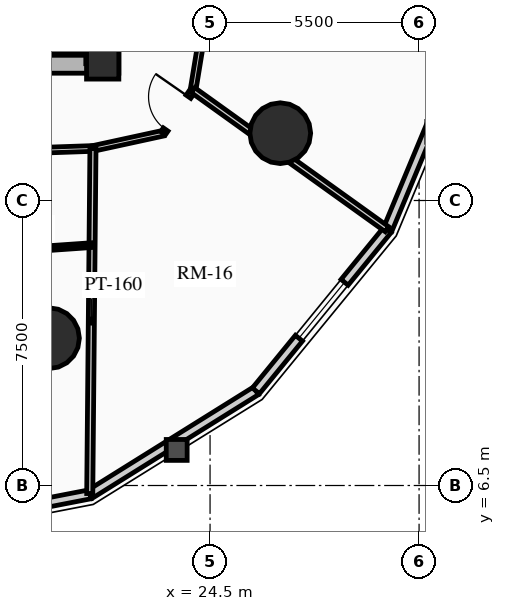
"""IFC4 building model, lengths in metres.
Left out: names, types, materials, properties, quantities, classifications, styles, units other than length and angle.
Written with IfcOpenShell. Run it as: python <this file> out.ifc"""

import sys

from ifc_helpers import new_model, si_unit, direction, frame, frame_2d, origin, origin_2d, place, context, subcontext, project, spatial, rectangle, circle, extrude, source, transform, mapped, element, fill, save


model = new_model("IFC4")
c1 = context("Model", 3, precision=1e-05, world=origin(), true_north=direction((0.0, 1.0)))
c2 = subcontext(c1, "Body", "Model", "MODEL_VIEW")
j1 = project(units=[si_unit("LENGTHUNIT", "METRE"), si_unit("PLANEANGLEUNIT", "RADIAN")], contexts=[c1])
p1 = place(None, origin())
s1 = spatial("IfcSite", under=j1, at=p1, CompositionType="ELEMENT")
p2 = place(p1, origin())
s2 = spatial("IfcBuilding", under=s1, at=p2, CompositionType="ELEMENT")
p3 = place(p2, frame((0.0, 0.0, 59.83)))
s3 = spatial("IfcBuildingStorey", under=s2, at=p3, CompositionType="ELEMENT", Elevation=59.83)
p4 = place(p3, frame((21.85, 17.35, 0.0), z_axis=(0.0, 0.0, 1.0), x_axis=(0.0, 1.0, 0.0)))
e1 = element("IfcWall", 1, at=p4, inside=s3, PredefinedType="SHEAR", context=c2, shape_type="SweptSolid", body=[
    extrude(rectangle(XDim=14.3, YDim=0.5, at=frame_2d((7.15, 0.0))), origin(), (0.0, 0.0, 1.0), 2.91),
])
p5 = place(p3, frame((11.15, 17.6, 0.0), z_axis=(0.0, 0.0, 1.0), x_axis=(1.0, 0.0, 0.0)))
e2 = element("IfcWall", 2, at=p5, inside=s3, PredefinedType="SHEAR", context=c2, shape_type="SweptSolid", body=[
    extrude(rectangle(XDim=10.7, YDim=0.5, at=frame_2d((5.35, 0.0))), origin(), (0.0, 0.0, 1.0), 2.91),
])
m1 = source(origin(), c2, "Body", "SweptSolid", [
    extrude(rectangle(XDim=1.5, YDim=2.02, at=frame_2d((0.75, 1.01))), frame((0.0, 0.26, 0.0), z_axis=(0.0, -1.0, 0.0), x_axis=(1.0, 0.0, 0.0)), (0.0, 0.0, 1.0), 0.52),
])
p6 = place(p5, frame((5.45, 0.0, 0.0)))
e3 = element("IfcOpeningElement", 3, at=p6, cuts=e2, PredefinedType="OPENING", context=c2, shape_type="MappedRepresentation", body=[
    mapped(m1, transform((0.0, 0.0, 0.0), x_axis=(1.0, 0.0, 0.0), y_axis=(0.0, 1.0, 0.0), z_axis=(0.0, 0.0, 1.0), scale=1.0)),
])
p7 = place(p3, frame((21.405, 17.6, 0.0), z_axis=(0.0, 0.0, 1.0), x_axis=(0.0, 1.0, 0.0)))
e4 = element("IfcWall", 4, at=p7, inside=s3, PredefinedType="SHEAR", context=c2, shape_type="SweptSolid", body=[
    extrude(rectangle(XDim=6.745, YDim=0.35, at=frame_2d((3.373, 0.0))), origin(), (0.0, 0.0, 1.0), 2.91),
])
p8 = place(p3, frame((21.675, 17.62, 0.0), z_axis=(0.0, 0.0, 1.0), x_axis=(1.0, 0.0, 0.0)))
e5 = element("IfcColumn", 5, at=p8, inside=s3, PredefinedType="COLUMN", context=c2, shape_type="SweptSolid", body=[
    extrude(rectangle(XDim=0.85, YDim=0.85, at=origin_2d()), origin(), (0.0, 0.0, 1.0), 2.91),
])
for number, where, z_axis, x_axis in (
    (6, (20.261, 10.377, 0.0), (0.0, 0.0, 1.0), (1.0, 0.0, 0.0)),
    (7, (26.347, 15.771, 0.0), (0.0, 0.0, 1.0), (1.0, 0.0, 0.0)),
):
    element("IfcColumn", number, at=place(p3, frame(where, z_axis=z_axis, x_axis=x_axis)), inside=s3, PredefinedType="USERDEFINED", context=c2, shape_type="SweptSolid", body=[
        extrude(circle(Radius=0.8, at=origin_2d()), origin(), (0.0, 0.0, 1.0), 2.91),
    ])
p9 = place(p3, frame((21.34, 6.268, 0.0), z_axis=(0.0, 0.0, 1.0), x_axis=(-0.981725274071, -0.190303668512, 0.0)))
e8 = element("IfcWall", 8, at=p9, inside=s3, PredefinedType="SOLIDWALL", context=c2, shape_type="SweptSolid", body=[
    extrude(rectangle(XDim=4.93, YDim=0.24, at=frame_2d((2.465, 0.0))), origin(), (0.0, 0.0, 1.0), 2.073),
])
m2 = source(origin(), c2, "Body", "SweptSolid", [
    extrude(rectangle(XDim=2.2, YDim=1.35, at=frame_2d((1.1, 0.675))), frame((0.0, 0.13, 0.0), z_axis=(0.0, -1.0, 0.0), x_axis=(1.0, 0.0, 0.0)), (0.0, 0.0, 1.0), 0.26),
])
p10 = place(p9, frame((1.365, 0.0, 0.65)))
e9 = element("IfcOpeningElement", 9, at=p10, cuts=e8, PredefinedType="OPENING", context=c2, shape_type="MappedRepresentation", body=[
    mapped(m2, transform((0.0, 0.0, 0.0), x_axis=(1.0, 0.0, 0.0), y_axis=(0.0, 1.0, 0.0), z_axis=(0.0, 0.0, 1.0), scale=1.0)),
])
p11 = place(p3, frame((25.707, 8.991, 0.0), z_axis=(0.0, 0.0, 1.0), x_axis=(-0.848533613342, -0.529141481107, 0.0)))
e10 = element("IfcWall", 10, at=p11, inside=s3, PredefinedType="SOLIDWALL", context=c2, shape_type="SweptSolid", body=[
    extrude(rectangle(XDim=5.146, YDim=0.24, at=frame_2d((2.573, 0.0))), origin(), (0.0, 0.0, 1.0), 2.073),
])
p12 = place(p3, frame((29.172, 13.232, 0.0), z_axis=(0.0, 0.0, 1.0), x_axis=(-0.632713287022, -0.77438614168, 0.0)))
e11 = element("IfcWall", 11, at=p12, inside=s3, PredefinedType="SOLIDWALL", context=c2, shape_type="SweptSolid", body=[
    extrude(rectangle(XDim=5.477, YDim=0.24, at=frame_2d((2.738, 0.0))), origin(), (0.0, 0.0, 1.0), 2.073),
])
m3 = source(origin(), c2, "Body", "SweptSolid", [
    extrude(rectangle(XDim=1.9, YDim=1.35, at=frame_2d((0.95, 0.675))), frame((0.0, 0.13, 0.0), z_axis=(0.0, -1.0, 0.0), x_axis=(1.0, 0.0, 0.0)), (0.0, 0.0, 1.0), 0.26),
])
p13 = place(p12, frame((1.788, 0.0, 0.65)))
e12 = element("IfcOpeningElement", 12, at=p13, cuts=e11, PredefinedType="OPENING", context=c2, shape_type="MappedRepresentation", body=[
    mapped(m3, transform((0.0, 0.0, 0.0), x_axis=(1.0, 0.0, 0.0), y_axis=(0.0, 1.0, 0.0), z_axis=(0.0, 0.0, 1.0), scale=1.0)),
])
p14 = place(p3, frame((31.396, 18.576, 0.0), z_axis=(0.0, 0.0, 1.0), x_axis=(-0.384348836956, -0.923187939442, 0.0)))
e13 = element("IfcWall", 13, at=p14, inside=s3, PredefinedType="SOLIDWALL", context=c2, shape_type="SweptSolid", body=[
    extrude(rectangle(XDim=5.789, YDim=0.24, at=frame_2d((2.894, 0.0))), origin(), (0.0, 0.0, 1.0), 2.073),
])
p15 = place(p3, frame((14.781, 15.141, 0.0), z_axis=(0.0, 0.0, 1.0), x_axis=(0.999407918707, 0.034406569513, 0.0)))
e14 = element("IfcWall", 14, at=p15, inside=s3, PredefinedType="PARTITIONING", context=c2, shape_type="SweptSolid", body=[
    extrude(rectangle(XDim=6.642, YDim=0.15, at=frame_2d((3.321, 0.0))), origin(), (0.0, 0.0, 1.0), 2.159),
])
p16 = place(p3, frame((21.419, 15.369, 0.0), z_axis=(0.0, 0.0, 1.0), x_axis=(0.977192701953, 0.212354475464, 0.0)))
e15 = element("IfcWall", 15, at=p16, inside=s3, PredefinedType="PARTITIONING", context=c2, shape_type="SweptSolid", body=[
    extrude(rectangle(XDim=1.888, YDim=0.15, at=frame_2d((0.944, 0.0))), origin(), (0.0, 0.0, 1.0), 2.205),
])
p17 = place(p3, frame((23.263, 15.77, 0.0), z_axis=(0.0, 0.0, 1.0), x_axis=(0.570743456919, 0.821128434768, 0.0)))
e16 = element("IfcWall", 16, at=p17, inside=s3, PredefinedType="PARTITIONING", context=c2, shape_type="SweptSolid", body=[
    extrude(rectangle(XDim=1.382, YDim=0.15, at=frame_2d((0.691, 0.0))), origin(), (0.0, 0.0, 1.0), 2.159),
])
m4 = source(origin(), c2, "Body", "SweptSolid", [
    extrude(rectangle(XDim=1.05, YDim=2.015, at=frame_2d((0.525, 1.007))), frame((0.0, 0.085, 0.0), z_axis=(0.0, -1.0, 0.0), x_axis=(1.0, 0.0, 0.0)), (0.0, 0.0, 1.0), 0.17),
])
p18 = place(p17, frame((0.12, 0.0, 0.0)))
e17 = element("IfcOpeningElement", 17, at=p18, cuts=e16, PredefinedType="OPENING", context=c2, shape_type="MappedRepresentation", body=[
    mapped(m4, transform((0.0, 0.0, 0.0), x_axis=(1.0, 0.0, 0.0), y_axis=(0.0, 1.0, 0.0), z_axis=(0.0, 0.0, 1.0), scale=1.0)),
])
p19 = place(p3, frame((24.052, 16.905, 0.0), z_axis=(0.0, 0.0, 1.0), x_axis=(0.162091534225, 0.986775726562, 0.0)))
e18 = element("IfcWall", 18, at=p19, inside=s3, PredefinedType="PARTITIONING", context=c2, shape_type="SweptSolid", body=[
    extrude(rectangle(XDim=1.613, YDim=0.15, at=frame_2d((0.807, 0.0))), origin(), (0.0, 0.0, 1.0), 2.205),
])
p20 = place(p3, frame((21.419, 15.369, 0.0), z_axis=(0.0, 0.0, 1.0), x_axis=(-0.009327801925, -0.999956495109, 0.0)))
e19 = element("IfcWall", 19, at=p20, inside=s3, PredefinedType="PARTITIONING", context=c2, shape_type="SweptSolid", body=[
    extrude(rectangle(XDim=9.082, YDim=0.16, at=frame_2d((4.541, 0.0))), origin(), (0.0, 0.0, 1.0), 2.073),
])
p21 = place(p3, frame((24.052, 16.905, 0.0), z_axis=(0.0, 0.0, 1.0), x_axis=(0.812581474608, -0.582847619129, 0.0)))
e20 = element("IfcWall", 20, at=p21, inside=s3, PredefinedType="PARTITIONING", context=c2, shape_type="SweptSolid", body=[
    extrude(rectangle(XDim=6.281, YDim=0.16, at=frame_2d((3.14, 0.0))), origin(), (0.0, 0.0, 1.0), 2.073),
])
p22 = place(p3, frame((15.262, 12.399, 0.0), z_axis=(0.0, 0.0, 1.0), x_axis=(0.997584901562, 0.069457643027, 0.0)))
e21 = element("IfcWall", 21, at=p22, inside=s3, PredefinedType="PARTITIONING", context=c2, shape_type="SweptSolid", body=[
    extrude(rectangle(XDim=6.148, YDim=0.125, at=frame_2d((3.074, 0.0))), origin(), (0.0, 0.0, 1.0), 2.159),
])
m5 = source(origin(), c2, "Body", "SweptSolid", [
    extrude(rectangle(XDim=0.9, YDim=2.005, at=frame_2d((0.45, 1.002))), frame((0.0, 0.073, 0.0), z_axis=(0.0, -1.0, 0.0), x_axis=(1.0, 0.0, 0.0)), (0.0, 0.0, 1.0), 0.145),
])
p23 = place(p22, frame((1.372, 0.0, 0.0)))
e22 = element("IfcOpeningElement", 22, at=p23, cuts=e21, PredefinedType="OPENING", context=c2, shape_type="MappedRepresentation", body=[
    mapped(m5, transform((0.0, 0.0, 0.0), x_axis=(1.0, 0.0, 0.0), y_axis=(0.0, 1.0, 0.0), z_axis=(0.0, 0.0, 1.0), scale=1.0)),
])
m6 = source(origin(), c2, "Body", "SweptSolid", [
    extrude(rectangle(XDim=1.9, YDim=1.35, at=frame_2d((0.95, 0.675))), frame((0.0, 0.03, 0.0), z_axis=(0.0, -1.0, 0.0), x_axis=(1.0, 0.0, 0.0)), (0.0, 0.0, 1.0), 0.06),
])
p24 = place(p13, origin())
e23 = element("IfcWindow", 23, at=p24, inside=s3, PartitioningType="DOUBLE_PANEL_VERTICAL", PredefinedType="WINDOW", context=c2, shape_type="MappedRepresentation", body=[
    mapped(m6, transform((0.0, 0.0, 0.0), x_axis=(1.0, 0.0, 0.0), y_axis=(0.0, 1.0, 0.0), z_axis=(0.0, 0.0, 1.0), scale=1.0)),
])
fill(e12, e23)
m7 = source(origin(), c2, "Body", "SweptSolid", [
    extrude(rectangle(XDim=1.05, YDim=2.015, at=frame_2d((0.525, 1.007))), frame((0.0, 0.025, 0.0), z_axis=(0.0, -1.0, 0.0), x_axis=(1.0, 0.0, 0.0)), (0.0, 0.0, 1.0), 0.05),
])
p25 = place(p18, origin())
e24 = element("IfcDoor", 24, at=p25, inside=s3, OperationType="SINGLE_SWING_RIGHT", PredefinedType="DOOR", context=c2, shape_type="MappedRepresentation", body=[
    mapped(m7, transform((0.0, 0.0, 0.0), x_axis=(1.0, 0.0, 0.0), y_axis=(0.0, 1.0, 0.0), z_axis=(0.0, 0.0, 1.0), scale=1.0)),
])
fill(e17, e24)
save(model, sys.argv[1])
